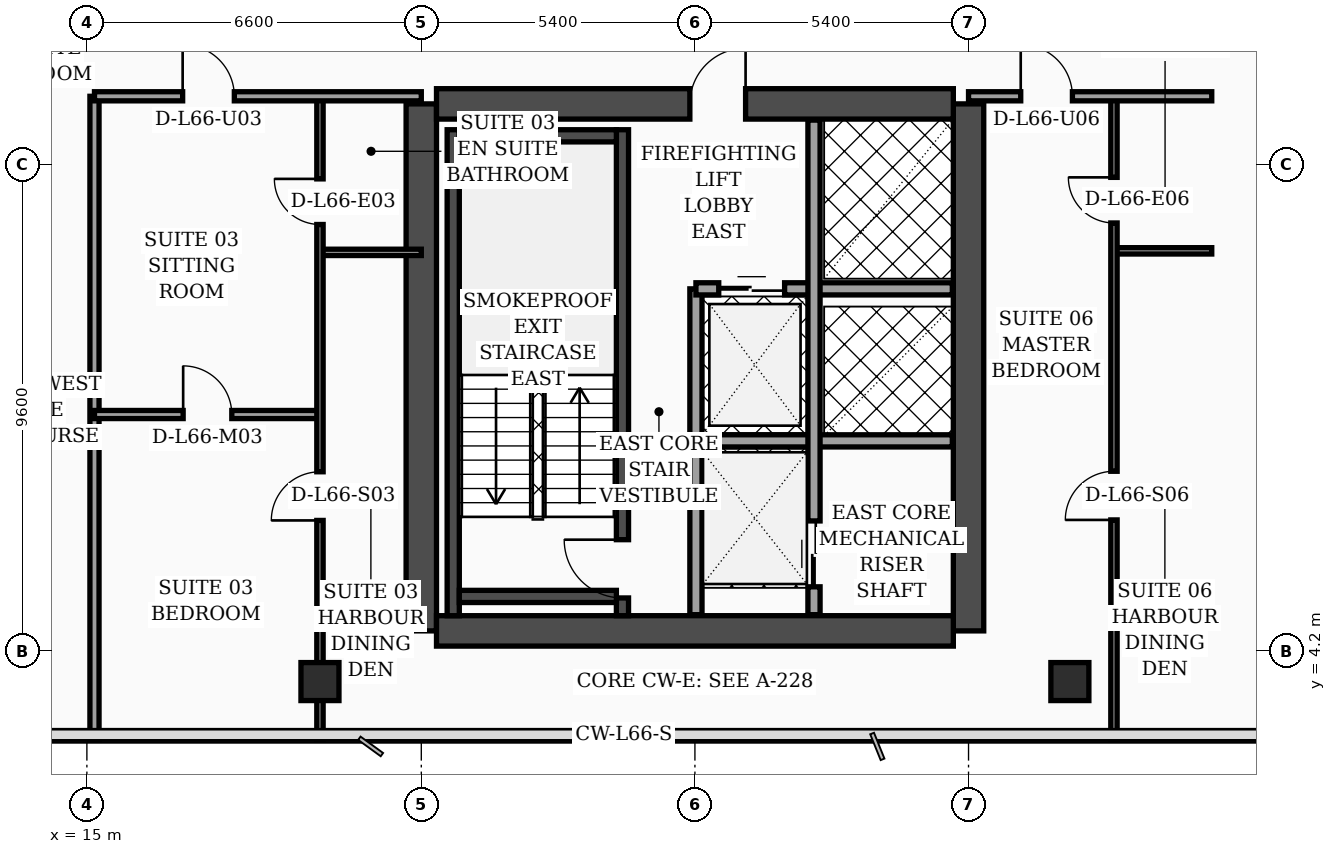
"""IFC4 building model, lengths in metres.
Left out: names, types, materials, properties, quantities, classifications, styles, units other than length and angle.
Written with IfcOpenShell. Run it as: python <this file> out.ifc"""

import sys

from ifc_helpers import new_model, si_unit, direction, frame, frame_2d, origin, origin_2d, place, context, subcontext, project, spatial, rectangle, hollow_rectangle, extrude, element, fill, save


model = new_model("IFC4")
c1 = context("Model", 3, precision=1e-05, world=origin(), true_north=direction((0.0, 1.0)))
c2 = subcontext(c1, "Body", "Model", "MODEL_VIEW")
j1 = project(units=[si_unit("LENGTHUNIT", "METRE"), si_unit("PLANEANGLEUNIT", "RADIAN")], contexts=[c1])
p1 = place(None, origin())
s1 = spatial("IfcSite", under=j1, at=p1, CompositionType="ELEMENT")
p2 = place(p1, origin())
s2 = spatial("IfcBuilding", under=s1, at=p2, CompositionType="ELEMENT")
p3 = place(p2, frame((0.0, 0.0, 267.3)))
s3 = spatial("IfcBuildingStorey", under=s2, at=p3, CompositionType="ELEMENT", Elevation=267.3)
for number, where, z_axis, x_axis in (
    (1, (21.6, 4.6, 0.0), (0.0, 0.0, 1.0), (0.0, 1.0, 0.0)),
    (2, (32.4, 4.6, 0.0), (0.0, 0.0, 1.0), (0.0, 1.0, 0.0)),
):
    element("IfcWall", number, at=place(p3, frame(where, z_axis=z_axis, x_axis=x_axis)), inside=s3, PredefinedType="SHEAR", context=c2, shape_type="SweptSolid", body=[
        extrude(rectangle(XDim=10.4, YDim=0.6, at=frame_2d((5.2, 0.0))), origin(), (0.0, 0.0, 1.0), 3.56),
    ])
p4 = place(p3, frame((21.9, 15.0, 0.0), z_axis=(0.0, 0.0, 1.0), x_axis=(1.0, 0.0, 0.0)))
e3 = element("IfcWall", 3, at=p4, inside=s3, PredefinedType="SHEAR", context=c2, shape_type="SweptSolid", body=[
    extrude(rectangle(XDim=10.2, YDim=0.6, at=frame_2d((5.1, 0.0))), origin(), (0.0, 0.0, 1.0), 3.56),
])
p5 = place(p4, frame((5.0, 0.0, 0.0)))
e4 = element("IfcOpeningElement", 4, at=p5, cuts=e3, PredefinedType="OPENING", context=c2, shape_type="SweptSolid", body=[
    extrude(rectangle(XDim=1.1, YDim=2.2, at=frame_2d((0.55, 1.1))), frame((0.0, 0.31, 0.0), z_axis=(0.0, -1.0, 0.0), x_axis=(1.0, 0.0, 0.0)), (0.0, 0.0, 1.0), 0.62),
])
p6 = place(p3, frame((21.9, 4.6, 0.0), z_axis=(0.0, 0.0, 1.0), x_axis=(1.0, 0.0, 0.0)))
e5 = element("IfcWall", 5, at=p6, inside=s3, PredefinedType="SHEAR", context=c2, shape_type="SweptSolid", body=[
    extrude(rectangle(XDim=10.2, YDim=0.6, at=frame_2d((5.1, 0.0))), origin(), (0.0, 0.0, 1.0), 3.56),
])
p7 = place(p3, frame((22.23, 4.9, 0.0), z_axis=(0.0, 0.0, 1.0), x_axis=(0.0, 1.0, 0.0)))
e6 = element("IfcWall", 6, at=p7, inside=s3, PredefinedType="SOLIDWALL", context=c2, shape_type="SweptSolid", body=[
    extrude(rectangle(XDim=9.59, YDim=0.24, at=frame_2d((4.795, 0.0))), origin(), (0.0, 0.0, 1.0), 3.56),
])
p8 = place(p3, frame((25.57, 4.9, 0.0), z_axis=(0.0, 0.0, 1.0), x_axis=(0.0, 1.0, 0.0)))
e7 = element("IfcWall", 7, at=p8, inside=s3, PredefinedType="SOLIDWALL", context=c2, shape_type="SweptSolid", body=[
    extrude(rectangle(XDim=9.59, YDim=0.24, at=frame_2d((4.795, 0.0))), origin(), (0.0, 0.0, 1.0), 3.56),
])
p9 = place(p8, frame((0.35, 0.0, 0.0)))
e8 = element("IfcOpeningElement", 8, at=p9, cuts=e7, PredefinedType="OPENING", context=c2, shape_type="SweptSolid", body=[
    extrude(rectangle(XDim=1.15, YDim=2.2, at=frame_2d((0.575, 1.1))), frame((0.0, 0.13, 0.0), z_axis=(0.0, -1.0, 0.0), x_axis=(1.0, 0.0, 0.0)), (0.0, 0.0, 1.0), 0.26),
])
for number, where, z_axis, x_axis in (
    (9, (22.35, 5.28, 0.0), (0.0, 0.0, 1.0), (1.0, 0.0, 0.0)),
    (10, (22.35, 14.37, 0.0), (0.0, 0.0, 1.0), (1.0, 0.0, 0.0)),
):
    element("IfcWall", number, at=place(p3, frame(where, z_axis=z_axis, x_axis=x_axis)), inside=s3, PredefinedType="SOLIDWALL", context=c2, shape_type="SweptSolid", body=[
        extrude(rectangle(XDim=3.1, YDim=0.24, at=frame_2d((1.55, 0.0))), origin(), (0.0, 0.0, 1.0), 3.56),
    ])
for number, where, z_axis, x_axis in (
    (11, (19.6, 3.6, 0.0), (0.0, 0.0, 1.0), (1.0, 0.0, 0.0)),
    (12, (34.4, 3.6, 0.0), (0.0, 0.0, 1.0), (1.0, 0.0, 0.0)),
):
    element("IfcColumn", number, at=place(p3, frame(where, z_axis=z_axis, x_axis=x_axis)), inside=s3, PredefinedType="COLUMN", context=c2, shape_type="SweptSolid", body=[
        extrude(hollow_rectangle(XDim=0.75, YDim=0.75, WallThickness=0.032, at=origin_2d()), origin(), (0.0, 0.0, 1.0), 3.56),
    ])
p10 = place(p3, frame((43.83, 5.505, 0.0), z_axis=(0.0, 0.0, 1.0), x_axis=(-0.300509063924, 0.953778958931, 0.0)))
e13 = element("IfcWall", 13, at=p10, inside=s3, PredefinedType="SOLIDWALL", context=c2, shape_type="SweptSolid", body=[
    extrude(rectangle(XDim=30.814, YDim=0.32, at=frame_2d((15.407, 0.0))), origin(), (0.0, 0.0, 1.0), 3.56),
])
p11 = place(p10, frame((4.747, 0.0, 0.0)))
e14 = element("IfcOpeningElement", 14, at=p11, cuts=e13, PredefinedType="OPENING", context=c2, shape_type="SweptSolid", body=[
    extrude(rectangle(XDim=1.4, YDim=2.25, at=frame_2d((0.7, 1.125))), frame((0.0, 0.17, 0.0), z_axis=(0.0, -1.0, 0.0), x_axis=(1.0, 0.0, 0.0)), (0.0, 0.0, 1.0), 0.34),
])
p12 = place(p10, frame((9.889, 0.0, 0.7)))
e15 = element("IfcOpeningElement", 15, at=p12, cuts=e13, PredefinedType="OPENING", context=c2, shape_type="SweptSolid", body=[
    extrude(rectangle(XDim=1.6, YDim=1.65, at=frame_2d((0.8, 0.825))), frame((0.0, 0.17, 0.0), z_axis=(0.0, -1.0, 0.0), x_axis=(1.0, 0.0, 0.0)), (0.0, 0.0, 1.0), 0.34),
])
p13 = place(p10, frame((18.696, 0.0, 0.7)))
e16 = element("IfcOpeningElement", 16, at=p13, cuts=e13, PredefinedType="OPENING", context=c2, shape_type="SweptSolid", body=[
    extrude(rectangle(XDim=1.6, YDim=1.65, at=frame_2d((0.8, 0.825))), frame((0.0, 0.17, 0.0), z_axis=(0.0, -1.0, 0.0), x_axis=(1.0, 0.0, 0.0)), (0.0, 0.0, 1.0), 0.34),
])
p14 = place(p10, frame((1.6, 0.0, 0.75)))
e17 = element("IfcOpeningElement", 17, at=p14, cuts=e13, PredefinedType="OPENING", context=c2, shape_type="SweptSolid", body=[
    extrude(rectangle(XDim=1.5, YDim=1.6, at=frame_2d((0.75, 0.8))), frame((0.0, 0.17, 0.0), z_axis=(0.0, -1.0, 0.0), x_axis=(1.0, 0.0, 0.0)), (0.0, 0.0, 1.0), 0.34),
])
p15 = place(p10, frame((7.8, 0.0, 0.75)))
e18 = element("IfcOpeningElement", 18, at=p15, cuts=e13, PredefinedType="OPENING", context=c2, shape_type="SweptSolid", body=[
    extrude(rectangle(XDim=1.5, YDim=1.6, at=frame_2d((0.75, 0.8))), frame((0.0, 0.17, 0.0), z_axis=(0.0, -1.0, 0.0), x_axis=(1.0, 0.0, 0.0)), (0.0, 0.0, 1.0), 0.34),
])
p16 = place(p10, frame((11.95, 0.0, 0.75)))
e19 = element("IfcOpeningElement", 19, at=p16, cuts=e13, PredefinedType="OPENING", context=c2, shape_type="SweptSolid", body=[
    extrude(rectangle(XDim=1.5, YDim=1.6, at=frame_2d((0.75, 0.8))), frame((0.0, 0.17, 0.0), z_axis=(0.0, -1.0, 0.0), x_axis=(1.0, 0.0, 0.0)), (0.0, 0.0, 1.0), 0.34),
])
p17 = place(p10, frame((14.0, 0.0, 0.75)))
e20 = element("IfcOpeningElement", 20, at=p17, cuts=e13, PredefinedType="OPENING", context=c2, shape_type="SweptSolid", body=[
    extrude(rectangle(XDim=1.5, YDim=1.6, at=frame_2d((0.75, 0.8))), frame((0.0, 0.17, 0.0), z_axis=(0.0, -1.0, 0.0), x_axis=(1.0, 0.0, 0.0)), (0.0, 0.0, 1.0), 0.34),
])
p18 = place(p10, frame((16.55, 0.0, 0.75)))
e21 = element("IfcOpeningElement", 21, at=p18, cuts=e13, PredefinedType="OPENING", context=c2, shape_type="SweptSolid", body=[
    extrude(rectangle(XDim=1.5, YDim=1.6, at=frame_2d((0.75, 0.8))), frame((0.0, 0.17, 0.0), z_axis=(0.0, -1.0, 0.0), x_axis=(1.0, 0.0, 0.0)), (0.0, 0.0, 1.0), 0.34),
])
p19 = place(p10, frame((20.75, 0.0, 0.75)))
e22 = element("IfcOpeningElement", 22, at=p19, cuts=e13, PredefinedType="OPENING", context=c2, shape_type="SweptSolid", body=[
    extrude(rectangle(XDim=1.5, YDim=1.6, at=frame_2d((0.75, 0.8))), frame((0.0, 0.17, 0.0), z_axis=(0.0, -1.0, 0.0), x_axis=(1.0, 0.0, 0.0)), (0.0, 0.0, 1.0), 0.34),
])
p20 = place(p10, frame((23.3, 0.0, 0.75)))
e23 = element("IfcOpeningElement", 23, at=p20, cuts=e13, PredefinedType="OPENING", context=c2, shape_type="SweptSolid", body=[
    extrude(rectangle(XDim=1.5, YDim=1.6, at=frame_2d((0.75, 0.8))), frame((0.0, 0.17, 0.0), z_axis=(0.0, -1.0, 0.0), x_axis=(1.0, 0.0, 0.0)), (0.0, 0.0, 1.0), 0.34),
])
p21 = place(p10, frame((26.4, 0.0, 0.75)))
e24 = element("IfcOpeningElement", 24, at=p21, cuts=e13, PredefinedType="OPENING", context=c2, shape_type="SweptSolid", body=[
    extrude(rectangle(XDim=1.5, YDim=1.6, at=frame_2d((0.75, 0.8))), frame((0.0, 0.17, 0.0), z_axis=(0.0, -1.0, 0.0), x_axis=(1.0, 0.0, 0.0)), (0.0, 0.0, 1.0), 0.34),
])
p22 = place(p3, frame((27.02, 4.92, 0.0), z_axis=(0.0, 0.0, 1.0), x_axis=(0.0, 1.0, 0.0)))
e25 = element("IfcWall", 25, at=p22, inside=s3, PredefinedType="SOLIDWALL", context=c2, shape_type="SweptSolid", body=[
    extrude(rectangle(XDim=6.43, YDim=0.24, at=frame_2d((3.215, 0.0))), origin(), (0.0, 0.0, 1.0), 3.56),
])
p23 = place(p3, frame((27.02, 11.35, 0.0), z_axis=(0.0, 0.0, 1.0), x_axis=(1.0, 0.0, 0.0)))
e26 = element("IfcWall", 26, at=p23, inside=s3, PredefinedType="SOLIDWALL", context=c2, shape_type="SweptSolid", body=[
    extrude(rectangle(XDim=5.06, YDim=0.24, at=frame_2d((2.53, 0.0))), origin(), (0.0, 0.0, 1.0), 3.56),
])
p24 = place(p23, frame((0.45, 0.0, 0.0)))
e27 = element("IfcOpeningElement", 27, at=p24, cuts=e26, PredefinedType="OPENING", context=c2, shape_type="SweptSolid", body=[
    extrude(rectangle(XDim=1.3, YDim=2.35, at=frame_2d((0.65, 1.175))), frame((0.0, 0.13, 0.0), z_axis=(0.0, -1.0, 0.0), x_axis=(1.0, 0.0, 0.0)), (0.0, 0.0, 1.0), 0.26),
])
p25 = place(p3, frame((27.02, 8.35, 0.0), z_axis=(0.0, 0.0, 1.0), x_axis=(1.0, 0.0, 0.0)))
e28 = element("IfcWall", 28, at=p25, inside=s3, PredefinedType="SOLIDWALL", context=c2, shape_type="SweptSolid", body=[
    extrude(rectangle(XDim=5.06, YDim=0.24, at=frame_2d((2.53, 0.0))), origin(), (0.0, 0.0, 1.0), 3.56),
])
p26 = place(p3, frame((29.35, 4.92, 0.0), z_axis=(0.0, 0.0, 1.0), x_axis=(0.0, 1.0, 0.0)))
e29 = element("IfcWall", 29, at=p26, inside=s3, PredefinedType="SOLIDWALL", context=c2, shape_type="SweptSolid", body=[
    extrude(rectangle(XDim=9.76, YDim=0.24, at=frame_2d((4.88, 0.0))), origin(), (0.0, 0.0, 1.0), 3.56),
])
p27 = place(p26, frame((0.55, 0.0, 0.0)))
e30 = element("IfcOpeningElement", 30, at=p27, cuts=e29, PredefinedType="OPENING", context=c2, shape_type="SweptSolid", body=[
    extrude(rectangle(XDim=1.3, YDim=2.35, at=frame_2d((0.65, 1.175))), frame((0.0, 0.13, 0.0), z_axis=(0.0, -1.0, 0.0), x_axis=(1.0, 0.0, 0.0)), (0.0, 0.0, 1.0), 0.26),
])
p28 = place(p3, frame((15.15, 2.44, 0.0), z_axis=(0.0, 0.0, 1.0), x_axis=(0.0, 1.0, 0.0)))
e31 = element("IfcWall", 31, at=p28, inside=s3, PredefinedType="PARTITIONING", context=c2, shape_type="SweptSolid", body=[
    extrude(rectangle(XDim=12.71, YDim=0.18, at=frame_2d((6.355, 0.0))), origin(), (0.0, 0.0, 1.0), 3.09),
])
p29 = place(p3, frame((19.6, 12.07, 0.0), z_axis=(0.0, 0.0, 1.0), x_axis=(1.0, 0.0, 0.0)))
e32 = element("IfcWall", 32, at=p29, inside=s3, PredefinedType="PARTITIONING", context=c2, shape_type="SweptSolid", body=[
    extrude(rectangle(XDim=2.0, YDim=0.125, at=frame_2d((1.0, 0.0))), origin(), (0.0, 0.0, 1.0), 3.56),
])
p30 = place(p3, frame((15.15, 8.87, 0.0), z_axis=(0.0, 0.0, 1.0), x_axis=(1.0, 0.0, 0.0)))
e33 = element("IfcWall", 33, at=p30, inside=s3, PredefinedType="PARTITIONING", context=c2, shape_type="SweptSolid", body=[
    extrude(rectangle(XDim=4.45, YDim=0.16, at=frame_2d((2.225, 0.0))), origin(), (0.0, 0.0, 1.0), 3.56),
])
p31 = place(p30, frame((1.75, 0.0, 0.0)))
e34 = element("IfcOpeningElement", 34, at=p31, cuts=e33, PredefinedType="OPENING", context=c2, shape_type="SweptSolid", body=[
    extrude(rectangle(XDim=0.96, YDim=2.2, at=frame_2d((0.48, 1.1))), frame((0.0, 0.09, 0.0), z_axis=(0.0, -1.0, 0.0), x_axis=(1.0, 0.0, 0.0)), (0.0, 0.0, 1.0), 0.18),
])
p32 = place(p3, frame((19.6, 2.44, 0.0), z_axis=(0.0, 0.0, 1.0), x_axis=(0.0, 1.0, 0.0)))
e35 = element("IfcWall", 35, at=p32, inside=s3, PredefinedType="PARTITIONING", context=c2, shape_type="SweptSolid", body=[
    extrude(rectangle(XDim=12.71, YDim=0.125, at=frame_2d((6.355, 0.0))), origin(), (0.0, 0.0, 1.0), 2.59),
])
p33 = place(p32, frame((4.34, 0.0, 0.0)))
e36 = element("IfcOpeningElement", 36, at=p33, cuts=e35, PredefinedType="OPENING", context=c2, shape_type="SweptSolid", body=[
    extrude(rectangle(XDim=0.96, YDim=2.2, at=frame_2d((0.48, 1.1))), frame((0.0, 0.073, 0.0), z_axis=(0.0, -1.0, 0.0), x_axis=(1.0, 0.0, 0.0)), (0.0, 0.0, 1.0), 0.145),
])
p34 = place(p32, frame((10.18, 0.0, 0.0)))
e37 = element("IfcOpeningElement", 37, at=p34, cuts=e35, PredefinedType="OPENING", context=c2, shape_type="SweptSolid", body=[
    extrude(rectangle(XDim=0.9, YDim=2.15, at=frame_2d((0.45, 1.075))), frame((0.0, 0.073, 0.0), z_axis=(0.0, -1.0, 0.0), x_axis=(1.0, 0.0, 0.0)), (0.0, 0.0, 1.0), 0.145),
])
p35 = place(p3, frame((15.15, 15.15, 0.0), z_axis=(0.0, 0.0, 1.0), x_axis=(1.0, 0.0, 0.0)))
e38 = element("IfcWall", 38, at=p35, inside=s3, PredefinedType="PARTITIONING", context=c2, shape_type="SweptSolid", body=[
    extrude(rectangle(XDim=6.45, YDim=0.18, at=frame_2d((3.225, 0.0))), origin(), (0.0, 0.0, 1.0), 2.59),
])
p36 = place(p35, frame((1.74, 0.0, 0.0)))
e39 = element("IfcOpeningElement", 39, at=p36, cuts=e38, PredefinedType="OPENING", context=c2, shape_type="SweptSolid", body=[
    extrude(rectangle(XDim=1.02, YDim=2.2, at=frame_2d((0.51, 1.1))), frame((0.0, 0.1, 0.0), z_axis=(0.0, -1.0, 0.0), x_axis=(1.0, 0.0, 0.0)), (0.0, 0.0, 1.0), 0.2),
])
p37 = place(p3, frame((35.27, 12.1, 0.0), z_axis=(0.0, 0.0, 1.0), x_axis=(1.0, 0.0, 0.0)))
e40 = element("IfcWall", 40, at=p37, inside=s3, PredefinedType="PARTITIONING", context=c2, shape_type="SweptSolid", body=[
    extrude(rectangle(XDim=1.93, YDim=0.125, at=frame_2d((0.965, 0.0))), origin(), (0.0, 0.0, 1.0), 3.56),
])
p38 = place(p3, frame((35.27, 2.44, 0.0), z_axis=(0.0, 0.0, 1.0), x_axis=(0.0, 1.0, 0.0)))
e41 = element("IfcWall", 41, at=p38, inside=s3, PredefinedType="PARTITIONING", context=c2, shape_type="SweptSolid", body=[
    extrude(rectangle(XDim=12.71, YDim=0.125, at=frame_2d((6.355, 0.0))), origin(), (0.0, 0.0, 1.0), 2.99),
])
p39 = place(p38, frame((4.35, 0.0, 0.0)))
e42 = element("IfcOpeningElement", 42, at=p39, cuts=e41, PredefinedType="OPENING", context=c2, shape_type="SweptSolid", body=[
    extrude(rectangle(XDim=0.96, YDim=2.2, at=frame_2d((0.48, 1.1))), frame((0.0, 0.073, 0.0), z_axis=(0.0, -1.0, 0.0), x_axis=(1.0, 0.0, 0.0)), (0.0, 0.0, 1.0), 0.145),
])
p40 = place(p38, frame((10.21, 0.0, 0.0)))
e43 = element("IfcOpeningElement", 43, at=p40, cuts=e41, PredefinedType="OPENING", context=c2, shape_type="SweptSolid", body=[
    extrude(rectangle(XDim=0.9, YDim=2.15, at=frame_2d((0.45, 1.075))), frame((0.0, 0.073, 0.0), z_axis=(0.0, -1.0, 0.0), x_axis=(1.0, 0.0, 0.0)), (0.0, 0.0, 1.0), 0.145),
])
p41 = place(p3, frame((32.4, 15.15, 0.0), z_axis=(0.0, 0.0, 1.0), x_axis=(1.0, 0.0, 0.0)))
e44 = element("IfcWall", 44, at=p41, inside=s3, PredefinedType="PARTITIONING", context=c2, shape_type="SweptSolid", body=[
    extrude(rectangle(XDim=4.8, YDim=0.18, at=frame_2d((2.4, 0.0))), origin(), (0.0, 0.0, 1.0), 2.99),
])
p42 = place(p41, frame((1.03, 0.0, 0.0)))
e45 = element("IfcOpeningElement", 45, at=p42, cuts=e44, PredefinedType="OPENING", context=c2, shape_type="SweptSolid", body=[
    extrude(rectangle(XDim=1.02, YDim=2.2, at=frame_2d((0.51, 1.1))), frame((0.0, 0.1, 0.0), z_axis=(0.0, -1.0, 0.0), x_axis=(1.0, 0.0, 0.0)), (0.0, 0.0, 1.0), 0.2),
])
p43 = place(p24, origin())
e46 = element("IfcDoor", 46, at=p43, inside=s3, OperationType="DOUBLE_DOOR_SLIDING", PredefinedType="DOOR", context=c2, shape_type="SweptSolid", body=[
    extrude(rectangle(XDim=1.3, YDim=2.35, at=frame_2d((0.65, 1.175))), frame((0.0, 0.025, 0.0), z_axis=(0.0, -1.0, 0.0), x_axis=(1.0, 0.0, 0.0)), (0.0, 0.0, 1.0), 0.05),
])
fill(e27, e46)
p44 = place(p27, origin())
e47 = element("IfcDoor", 47, at=p44, inside=s3, OperationType="DOUBLE_DOOR_SLIDING", PredefinedType="DOOR", context=c2, shape_type="SweptSolid", body=[
    extrude(rectangle(XDim=1.3, YDim=2.35, at=frame_2d((0.65, 1.175))), frame((0.0, 0.025, 0.0), z_axis=(0.0, -1.0, 0.0), x_axis=(1.0, 0.0, 0.0)), (0.0, 0.0, 1.0), 0.05),
])
fill(e30, e47)
p45 = place(p31, origin())
e48 = element("IfcDoor", 48, at=p45, inside=s3, OperationType="SINGLE_SWING_LEFT", PredefinedType="DOOR", context=c2, shape_type="SweptSolid", body=[
    extrude(rectangle(XDim=0.96, YDim=2.2, at=frame_2d((0.48, 1.1))), frame((0.0, 0.025, 0.0), z_axis=(0.0, -1.0, 0.0), x_axis=(1.0, 0.0, 0.0)), (0.0, 0.0, 1.0), 0.05),
])
fill(e34, e48)
p46 = place(p33, origin())
e49 = element("IfcDoor", 49, at=p46, inside=s3, OperationType="SINGLE_SWING_LEFT", PredefinedType="DOOR", context=c2, shape_type="SweptSolid", body=[
    extrude(rectangle(XDim=0.96, YDim=2.2, at=frame_2d((0.48, 1.1))), frame((0.0, 0.025, 0.0), z_axis=(0.0, -1.0, 0.0), x_axis=(1.0, 0.0, 0.0)), (0.0, 0.0, 1.0), 0.05),
])
fill(e36, e49)
p47 = place(p34, origin())
e50 = element("IfcDoor", 50, at=p47, inside=s3, OperationType="SINGLE_SWING_RIGHT", PredefinedType="DOOR", context=c2, shape_type="SweptSolid", body=[
    extrude(rectangle(XDim=0.9, YDim=2.15, at=frame_2d((0.45, 1.075))), frame((0.0, 0.025, 0.0), z_axis=(0.0, -1.0, 0.0), x_axis=(1.0, 0.0, 0.0)), (0.0, 0.0, 1.0), 0.05),
])
fill(e37, e50)
p48 = place(p36, origin())
e51 = element("IfcDoor", 51, at=p48, inside=s3, OperationType="SINGLE_SWING_LEFT", PredefinedType="DOOR", context=c2, shape_type="SweptSolid", body=[
    extrude(rectangle(XDim=1.02, YDim=2.2, at=frame_2d((0.51, 1.1))), frame((0.0, 0.025, 0.0), z_axis=(0.0, -1.0, 0.0), x_axis=(1.0, 0.0, 0.0)), (0.0, 0.0, 1.0), 0.05),
])
fill(e39, e51)
p49 = place(p39, origin())
e52 = element("IfcDoor", 52, at=p49, inside=s3, OperationType="SINGLE_SWING_LEFT", PredefinedType="DOOR", context=c2, shape_type="SweptSolid", body=[
    extrude(rectangle(XDim=0.96, YDim=2.2, at=frame_2d((0.48, 1.1))), frame((0.0, 0.025, 0.0), z_axis=(0.0, -1.0, 0.0), x_axis=(1.0, 0.0, 0.0)), (0.0, 0.0, 1.0), 0.05),
])
fill(e42, e52)
p50 = place(p40, origin())
e53 = element("IfcDoor", 53, at=p50, inside=s3, OperationType="SINGLE_SWING_RIGHT", PredefinedType="DOOR", context=c2, shape_type="SweptSolid", body=[
    extrude(rectangle(XDim=0.9, YDim=2.15, at=frame_2d((0.45, 1.075))), frame((0.0, 0.025, 0.0), z_axis=(0.0, -1.0, 0.0), x_axis=(1.0, 0.0, 0.0)), (0.0, 0.0, 1.0), 0.05),
])
fill(e43, e53)
p51 = place(p42, origin())
e54 = element("IfcDoor", 54, at=p51, inside=s3, OperationType="SINGLE_SWING_LEFT", PredefinedType="DOOR", context=c2, shape_type="SweptSolid", body=[
    extrude(rectangle(XDim=1.02, YDim=2.2, at=frame_2d((0.51, 1.1))), frame((0.0, 0.025, 0.0), z_axis=(0.0, -1.0, 0.0), x_axis=(1.0, 0.0, 0.0)), (0.0, 0.0, 1.0), 0.05),
])
fill(e45, e54)
p52 = place(p9, origin())
e55 = element("IfcDoor", 55, at=p52, inside=s3, OperationType="SINGLE_SWING_RIGHT", PredefinedType="DOOR", context=c2, shape_type="SweptSolid", body=[
    extrude(rectangle(XDim=1.15, YDim=2.2, at=frame_2d((0.575, 1.1))), frame((0.0, 0.025, 0.0), z_axis=(0.0, -1.0, 0.0), x_axis=(1.0, 0.0, 0.0)), (0.0, 0.0, 1.0), 0.05),
])
fill(e8, e55)
p53 = place(p5, origin())
e56 = element("IfcDoor", 56, at=p53, inside=s3, OperationType="SINGLE_SWING_RIGHT", PredefinedType="DOOR", context=c2, shape_type="SweptSolid", body=[
    extrude(rectangle(XDim=1.1, YDim=2.2, at=frame_2d((0.55, 1.1))), frame((0.0, 0.025, 0.0), z_axis=(0.0, -1.0, 0.0), x_axis=(1.0, 0.0, 0.0)), (0.0, 0.0, 1.0), 0.05),
])
fill(e4, e56)
save(model, sys.argv[1])
